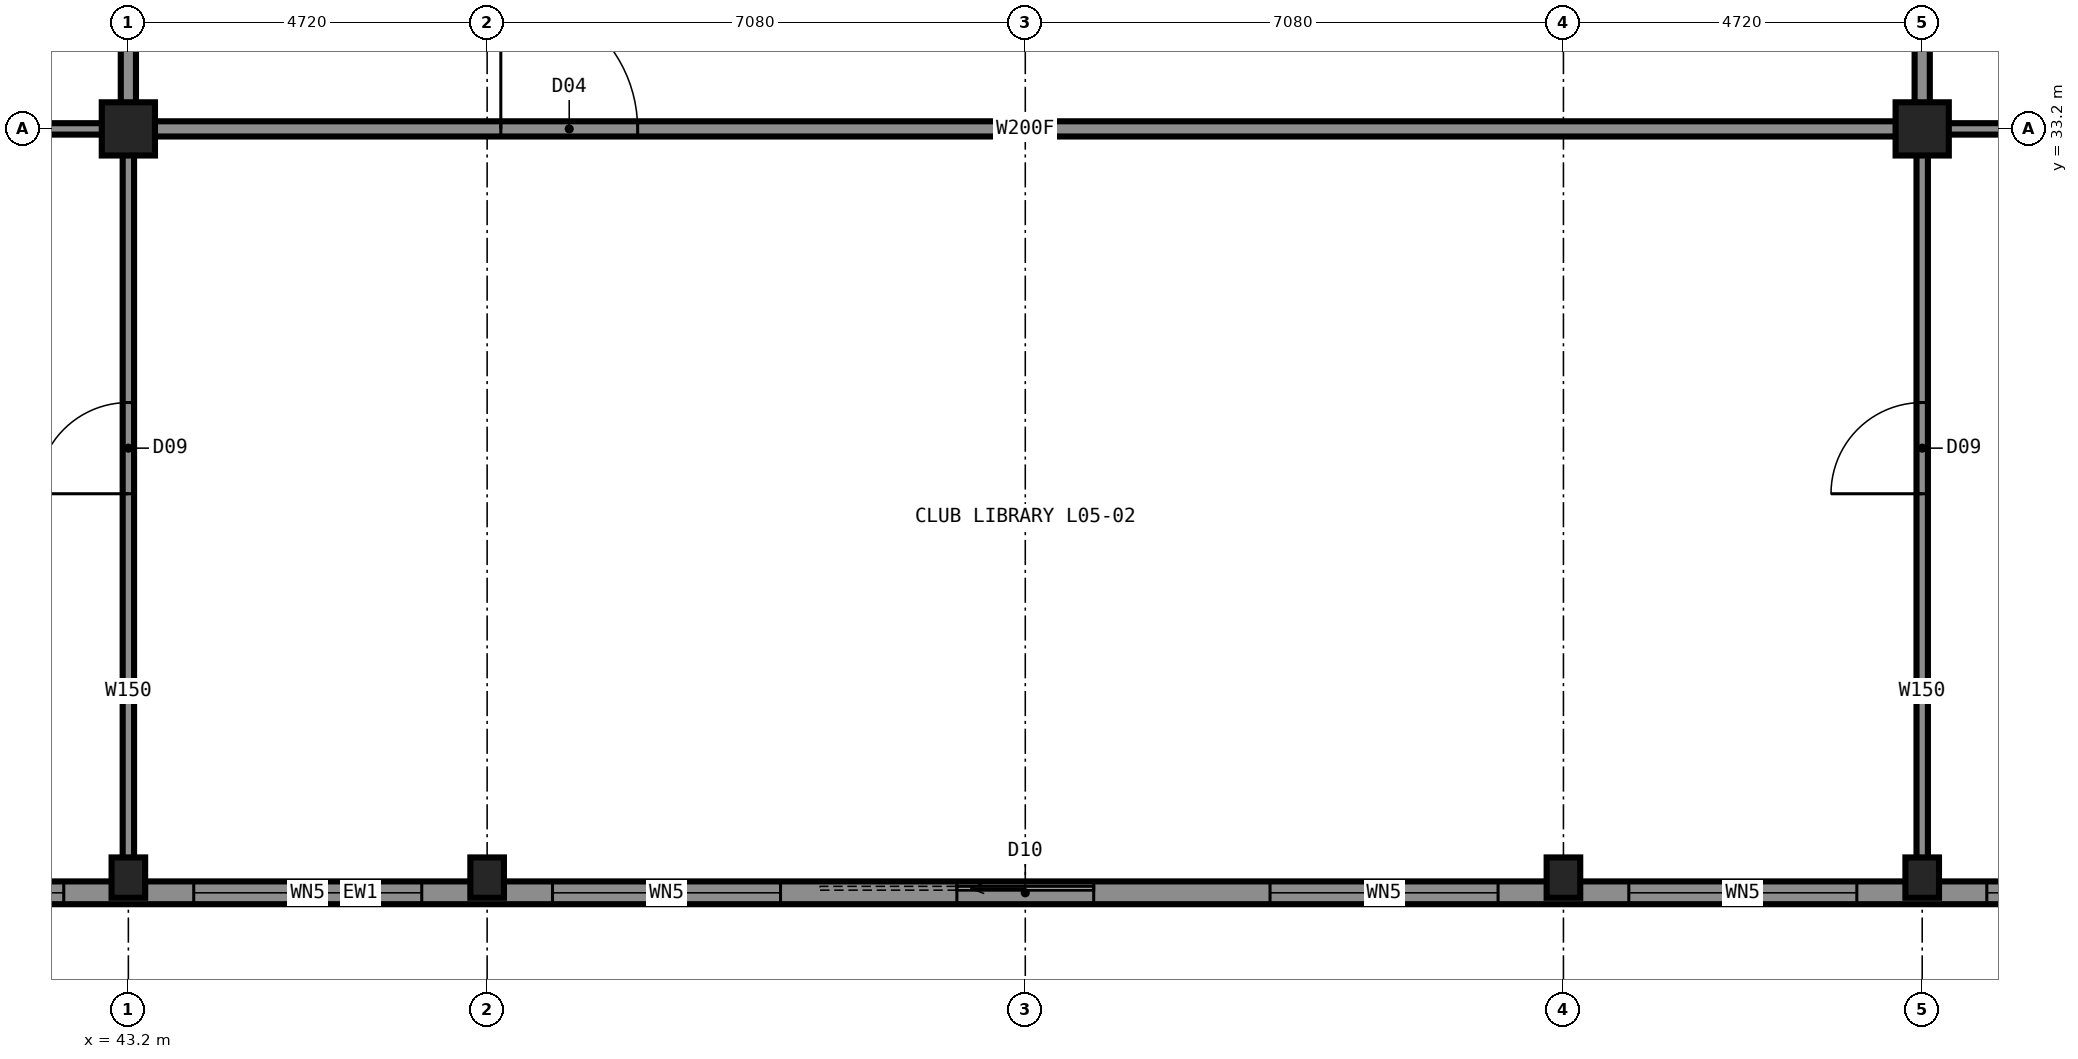
"""IFC4 building model, lengths in metres.
Left out: names, types, materials, properties, quantities, classifications, styles, units other than length and angle.
Written with IfcOpenShell. Run it as: python <this file> out.ifc"""

import sys

from ifc_helpers import new_model, si_unit, direction, frame, frame_2d, origin, origin_2d, place, context, subcontext, project, spatial, rectangle, hollow_rectangle, i_section, extrude, element, fill, save


model = new_model("IFC4")
c1 = context("Model", 3, precision=1e-05, world=origin(), true_north=direction((0.0, 1.0)))
c2 = subcontext(c1, "Body", "Model", "MODEL_VIEW")
j1 = project(units=[si_unit("LENGTHUNIT", "METRE"), si_unit("PLANEANGLEUNIT", "RADIAN")], contexts=[c1])
p1 = place(None, origin())
s1 = spatial("IfcSite", under=j1, at=p1, CompositionType="ELEMENT")
p2 = place(p1, origin())
s2 = spatial("IfcBuilding", under=s1, at=p2, CompositionType="ELEMENT")
p3 = place(p2, frame((0.0, 0.0, 25.0)))
s3 = spatial("IfcBuildingStorey", under=s2, at=p3, CompositionType="ELEMENT", Elevation=25.0)
for number, where, z_axis, x_axis in (
    (1, (43.2, 23.35, 0.0), (0.0, 0.0, 1.0), (1.0, 0.0, 0.0)),
    (2, (47.92, 23.35, 0.0), (0.0, 0.0, 1.0), (1.0, 0.0, 0.0)),
    (3, (62.08, 23.35, 0.0), (0.0, 0.0, 1.0), (1.0, 0.0, 0.0)),
    (4, (66.8, 23.35, 0.0), (0.0, 0.0, 1.0), (1.0, 0.0, 0.0)),
):
    element("IfcColumn", number, at=place(p3, frame(where, z_axis=z_axis, x_axis=x_axis)), inside=s3, PredefinedType="COLUMN", context=c2, shape_type="SweptSolid", body=[
        extrude(i_section(OverallWidth=0.442, OverallDepth=0.531, WebThickness=0.066, FlangeThickness=0.106, at=origin_2d()), origin(), (0.0, 0.0, 1.0), 3.5),
    ])
for number, where, z_axis, x_axis in (
    (5, (43.2, 33.2, 0.0), (0.0, 0.0, 1.0), (1.0, 0.0, 0.0)),
    (6, (66.8, 33.2, 0.0), (0.0, 0.0, 1.0), (1.0, 0.0, 0.0)),
):
    element("IfcColumn", number, at=place(p3, frame(where, z_axis=z_axis, x_axis=x_axis)), inside=s3, PredefinedType="COLUMN", context=c2, shape_type="SweptSolid", body=[
        extrude(hollow_rectangle(XDim=0.7, YDim=0.7, WallThickness=0.06, at=origin_2d()), origin(), (0.0, 0.0, 1.0), 3.5),
    ])
p4 = place(p3, frame((43.2, 33.2, 0.0), z_axis=(0.0, 0.0, 1.0), x_axis=(1.0, 0.0, 0.0)))
e7 = element("IfcWall", 7, at=p4, inside=s3, PredefinedType="PARTITIONING", context=c2, shape_type="SweptSolid", body=[
    extrude(rectangle(XDim=23.6, YDim=0.2, at=frame_2d((11.8, 0.0))), origin(), (0.0, 0.0, 1.0), 3.33),
])
p5 = place(p4, frame((4.9, 0.0, 0.0)))
e8 = element("IfcOpeningElement", 8, at=p5, cuts=e7, PredefinedType="OPENING", context=c2, shape_type="SweptSolid", body=[
    extrude(rectangle(XDim=1.8, YDim=2.2, at=frame_2d((0.9, 1.1))), frame((0.0, 0.11, 0.0), z_axis=(0.0, -1.0, 0.0), x_axis=(1.0, 0.0, 0.0)), (0.0, 0.0, 1.0), 0.22),
])
for number, where, z_axis, x_axis in (
    (9, (33.3, 33.2, 0.0), (0.0, 0.0, 1.0), (1.0, 0.0, 0.0)),
    (10, (66.8, 33.2, 0.0), (0.0, 0.0, 1.0), (1.0, 0.0, 0.0)),
):
    element("IfcWall", number, at=place(p3, frame(where, z_axis=z_axis, x_axis=x_axis)), inside=s3, PredefinedType="PARTITIONING", context=c2, shape_type="SweptSolid", body=[
        extrude(rectangle(XDim=9.9, YDim=0.15, at=frame_2d((4.95, 0.0))), origin(), (0.0, 0.0, 1.0), 2.573),
    ])
p6 = place(p3, frame((43.2, 33.2, 0.0), z_axis=(0.0, 0.0, 1.0), x_axis=(0.0, 1.0, 0.0)))
e11 = element("IfcWall", 11, at=p6, inside=s3, PredefinedType="PARTITIONING", context=c2, shape_type="SweptSolid", body=[
    extrude(rectangle(XDim=23.6, YDim=0.2, at=frame_2d((11.8, 0.0))), origin(), (0.0, 0.0, 1.0), 3.33),
])
p7 = place(p6, frame((13.2, 0.0, 0.0)))
e12 = element("IfcOpeningElement", 12, at=p7, cuts=e11, PredefinedType="OPENING", context=c2, shape_type="SweptSolid", body=[
    extrude(rectangle(XDim=1.2, YDim=2.2, at=frame_2d((0.6, 1.1))), frame((0.0, 0.11, 0.0), z_axis=(0.0, -1.0, 0.0), x_axis=(1.0, 0.0, 0.0)), (0.0, 0.0, 1.0), 0.22),
])
p8 = place(p3, frame((43.2, 23.3, 0.0), z_axis=(0.0, 0.0, 1.0), x_axis=(0.0, 1.0, 0.0)))
e13 = element("IfcWall", 13, at=p8, inside=s3, PredefinedType="PARTITIONING", context=c2, shape_type="SweptSolid", body=[
    extrude(rectangle(XDim=9.9, YDim=0.15, at=frame_2d((4.95, 0.0))), origin(), (0.0, 0.0, 1.0), 2.573),
])
p9 = place(p8, frame((5.1, 0.0, 0.0)))
e14 = element("IfcOpeningElement", 14, at=p9, cuts=e13, PredefinedType="OPENING", context=c2, shape_type="SweptSolid", body=[
    extrude(rectangle(XDim=1.2, YDim=2.2, at=frame_2d((0.6, 1.1))), frame((0.0, 0.085, 0.0), z_axis=(0.0, -1.0, 0.0), x_axis=(1.0, 0.0, 0.0)), (0.0, 0.0, 1.0), 0.17),
])
p10 = place(p3, frame((66.8, 33.2, 0.0), z_axis=(0.0, 0.0, 1.0), x_axis=(0.0, 1.0, 0.0)))
e15 = element("IfcWall", 15, at=p10, inside=s3, PredefinedType="PARTITIONING", context=c2, shape_type="SweptSolid", body=[
    extrude(rectangle(XDim=23.6, YDim=0.2, at=frame_2d((11.8, 0.0))), origin(), (0.0, 0.0, 1.0), 3.33),
])
p11 = place(p10, frame((18.2, 0.0, 0.0)))
e16 = element("IfcOpeningElement", 16, at=p11, cuts=e15, PredefinedType="OPENING", context=c2, shape_type="SweptSolid", body=[
    extrude(rectangle(XDim=1.2, YDim=2.2, at=frame_2d((0.6, 1.1))), frame((0.0, 0.11, 0.0), z_axis=(0.0, -1.0, 0.0), x_axis=(1.0, 0.0, 0.0)), (0.0, 0.0, 1.0), 0.22),
])
p12 = place(p10, frame((10.12, 0.0, 0.0)))
e17 = element("IfcOpeningElement", 17, at=p12, cuts=e15, PredefinedType="OPENING", context=c2, shape_type="SweptSolid", body=[
    extrude(rectangle(XDim=1.0, YDim=2.1, at=frame_2d((0.5, 1.05))), frame((0.0, 0.11, 0.0), z_axis=(0.0, -1.0, 0.0), x_axis=(1.0, 0.0, 0.0)), (0.0, 0.0, 1.0), 0.22),
])
p13 = place(p10, frame((12.53, 0.0, 0.0)))
e18 = element("IfcOpeningElement", 18, at=p13, cuts=e15, PredefinedType="OPENING", context=c2, shape_type="SweptSolid", body=[
    extrude(rectangle(XDim=0.9, YDim=2.1, at=frame_2d((0.45, 1.05))), frame((0.0, 0.11, 0.0), z_axis=(0.0, -1.0, 0.0), x_axis=(1.0, 0.0, 0.0)), (0.0, 0.0, 1.0), 0.22),
])
p14 = place(p10, frame((1.91, 0.0, 0.0)))
e19 = element("IfcOpeningElement", 19, at=p14, cuts=e15, PredefinedType="OPENING", context=c2, shape_type="SweptSolid", body=[
    extrude(rectangle(XDim=0.9, YDim=2.1, at=frame_2d((0.45, 1.05))), frame((0.0, 0.11, 0.0), z_axis=(0.0, -1.0, 0.0), x_axis=(1.0, 0.0, 0.0)), (0.0, 0.0, 1.0), 0.22),
])
p15 = place(p10, frame((6.63, 0.0, 0.0)))
e20 = element("IfcOpeningElement", 20, at=p15, cuts=e15, PredefinedType="OPENING", context=c2, shape_type="SweptSolid", body=[
    extrude(rectangle(XDim=0.9, YDim=2.1, at=frame_2d((0.45, 1.05))), frame((0.0, 0.11, 0.0), z_axis=(0.0, -1.0, 0.0), x_axis=(1.0, 0.0, 0.0)), (0.0, 0.0, 1.0), 0.22),
])
p16 = place(p3, frame((66.8, 23.3, 0.0), z_axis=(0.0, 0.0, 1.0), x_axis=(0.0, 1.0, 0.0)))
e21 = element("IfcWall", 21, at=p16, inside=s3, PredefinedType="PARTITIONING", context=c2, shape_type="SweptSolid", body=[
    extrude(rectangle(XDim=9.9, YDim=0.15, at=frame_2d((4.95, 0.0))), origin(), (0.0, 0.0, 1.0), 2.573),
])
p17 = place(p16, frame((5.1, 0.0, 0.0)))
e22 = element("IfcOpeningElement", 22, at=p17, cuts=e21, PredefinedType="OPENING", context=c2, shape_type="SweptSolid", body=[
    extrude(rectangle(XDim=1.2, YDim=2.2, at=frame_2d((0.6, 1.1))), frame((0.0, 0.085, 0.0), z_axis=(0.0, -1.0, 0.0), x_axis=(1.0, 0.0, 0.0)), (0.0, 0.0, 1.0), 0.17),
])
p18 = place(p3, frame((38.5, 23.15, 0.0), z_axis=(0.0, 0.0, 1.0), x_axis=(1.0, 0.0, 0.0)))
e23 = element("IfcWall", 23, at=p18, inside=s3, PredefinedType="SOLIDWALL", context=c2, shape_type="SweptSolid", body=[
    extrude(rectangle(XDim=33.0, YDim=0.3, at=frame_2d((16.5, 0.0))), origin(), (0.0, 0.0, 1.0), 2.83),
])
p19 = place(p18, frame((0.85, 0.0, 0.3)))
e24 = element("IfcOpeningElement", 24, at=p19, cuts=e23, PredefinedType="OPENING", context=c2, shape_type="SweptSolid", body=[
    extrude(rectangle(XDim=3.0, YDim=2.5, at=frame_2d((1.5, 1.25))), frame((0.0, 0.16, 0.0), z_axis=(0.0, -1.0, 0.0), x_axis=(1.0, 0.0, 0.0)), (0.0, 0.0, 1.0), 0.32),
])
p20 = place(p18, frame((5.56, 0.0, 0.3)))
e25 = element("IfcOpeningElement", 25, at=p20, cuts=e23, PredefinedType="OPENING", context=c2, shape_type="SweptSolid", body=[
    extrude(rectangle(XDim=3.0, YDim=2.5, at=frame_2d((1.5, 1.25))), frame((0.0, 0.16, 0.0), z_axis=(0.0, -1.0, 0.0), x_axis=(1.0, 0.0, 0.0)), (0.0, 0.0, 1.0), 0.32),
])
p21 = place(p18, frame((10.28, 0.0, 0.3)))
e26 = element("IfcOpeningElement", 26, at=p21, cuts=e23, PredefinedType="OPENING", context=c2, shape_type="SweptSolid", body=[
    extrude(rectangle(XDim=3.0, YDim=2.5, at=frame_2d((1.5, 1.25))), frame((0.0, 0.16, 0.0), z_axis=(0.0, -1.0, 0.0), x_axis=(1.0, 0.0, 0.0)), (0.0, 0.0, 1.0), 0.32),
])
p22 = place(p18, frame((15.6, 0.0, 0.0)))
e27 = element("IfcOpeningElement", 27, at=p22, cuts=e23, PredefinedType="OPENING", context=c2, shape_type="SweptSolid", body=[
    extrude(rectangle(XDim=1.8, YDim=2.4, at=frame_2d((0.9, 1.2))), frame((0.0, 0.16, 0.0), z_axis=(0.0, -1.0, 0.0), x_axis=(1.0, 0.0, 0.0)), (0.0, 0.0, 1.0), 0.32),
])
p23 = place(p18, frame((19.72, 0.0, 0.3)))
e28 = element("IfcOpeningElement", 28, at=p23, cuts=e23, PredefinedType="OPENING", context=c2, shape_type="SweptSolid", body=[
    extrude(rectangle(XDim=3.0, YDim=2.5, at=frame_2d((1.5, 1.25))), frame((0.0, 0.16, 0.0), z_axis=(0.0, -1.0, 0.0), x_axis=(1.0, 0.0, 0.0)), (0.0, 0.0, 1.0), 0.32),
])
p24 = place(p18, frame((24.44, 0.0, 0.3)))
e29 = element("IfcOpeningElement", 29, at=p24, cuts=e23, PredefinedType="OPENING", context=c2, shape_type="SweptSolid", body=[
    extrude(rectangle(XDim=3.0, YDim=2.5, at=frame_2d((1.5, 1.25))), frame((0.0, 0.16, 0.0), z_axis=(0.0, -1.0, 0.0), x_axis=(1.0, 0.0, 0.0)), (0.0, 0.0, 1.0), 0.32),
])
p25 = place(p18, frame((29.15, 0.0, 0.3)))
e30 = element("IfcOpeningElement", 30, at=p25, cuts=e23, PredefinedType="OPENING", context=c2, shape_type="SweptSolid", body=[
    extrude(rectangle(XDim=3.0, YDim=2.5, at=frame_2d((1.5, 1.25))), frame((0.0, 0.16, 0.0), z_axis=(0.0, -1.0, 0.0), x_axis=(1.0, 0.0, 0.0)), (0.0, 0.0, 1.0), 0.32),
])
p26 = place(p5, origin())
e31 = element("IfcDoor", 31, at=p26, inside=s3, OperationType="DOUBLE_DOOR_SINGLE_SWING", PredefinedType="DOOR", context=c2, shape_type="SweptSolid", body=[
    extrude(rectangle(XDim=1.8, YDim=2.2, at=frame_2d((0.9, 1.1))), frame((0.0, 0.025, 0.0), z_axis=(0.0, -1.0, 0.0), x_axis=(1.0, 0.0, 0.0)), (0.0, 0.0, 1.0), 0.05),
])
fill(e8, e31)
p27 = place(p17, origin())
e32 = element("IfcDoor", 32, at=p27, inside=s3, OperationType="SINGLE_SWING_LEFT", PredefinedType="DOOR", context=c2, shape_type="SweptSolid", body=[
    extrude(rectangle(XDim=1.2, YDim=2.2, at=frame_2d((0.6, 1.1))), frame((0.0, 0.025, 0.0), z_axis=(0.0, -1.0, 0.0), x_axis=(1.0, 0.0, 0.0)), (0.0, 0.0, 1.0), 0.05),
])
fill(e22, e32)
p28 = place(p9, origin())
e33 = element("IfcDoor", 33, at=p28, inside=s3, OperationType="SINGLE_SWING_LEFT", PredefinedType="DOOR", context=c2, shape_type="SweptSolid", body=[
    extrude(rectangle(XDim=1.2, YDim=2.2, at=frame_2d((0.6, 1.1))), frame((0.0, 0.025, 0.0), z_axis=(0.0, -1.0, 0.0), x_axis=(1.0, 0.0, 0.0)), (0.0, 0.0, 1.0), 0.05),
])
fill(e14, e33)
p29 = place(p19, origin())
e34 = element("IfcWindow", 34, at=p29, inside=s3, PartitioningType="SINGLE_PANEL", PredefinedType="WINDOW", context=c2, shape_type="SweptSolid", body=[
    extrude(rectangle(XDim=3.0, YDim=2.5, at=frame_2d((1.5, 1.25))), frame((0.0, 0.03, 0.0), z_axis=(0.0, -1.0, 0.0), x_axis=(1.0, 0.0, 0.0)), (0.0, 0.0, 1.0), 0.06),
])
fill(e24, e34)
p30 = place(p20, origin())
e35 = element("IfcWindow", 35, at=p30, inside=s3, PartitioningType="SINGLE_PANEL", PredefinedType="WINDOW", context=c2, shape_type="SweptSolid", body=[
    extrude(rectangle(XDim=3.0, YDim=2.5, at=frame_2d((1.5, 1.25))), frame((0.0, 0.03, 0.0), z_axis=(0.0, -1.0, 0.0), x_axis=(1.0, 0.0, 0.0)), (0.0, 0.0, 1.0), 0.06),
])
fill(e25, e35)
p31 = place(p21, origin())
e36 = element("IfcWindow", 36, at=p31, inside=s3, PartitioningType="SINGLE_PANEL", PredefinedType="WINDOW", context=c2, shape_type="SweptSolid", body=[
    extrude(rectangle(XDim=3.0, YDim=2.5, at=frame_2d((1.5, 1.25))), frame((0.0, 0.03, 0.0), z_axis=(0.0, -1.0, 0.0), x_axis=(1.0, 0.0, 0.0)), (0.0, 0.0, 1.0), 0.06),
])
fill(e26, e36)
p32 = place(p22, origin())
e37 = element("IfcDoor", 37, at=p32, inside=s3, OperationType="SLIDING_TO_LEFT", PredefinedType="DOOR", context=c2, shape_type="SweptSolid", body=[
    extrude(rectangle(XDim=1.8, YDim=2.4, at=frame_2d((0.9, 1.2))), frame((0.0, 0.025, 0.0), z_axis=(0.0, -1.0, 0.0), x_axis=(1.0, 0.0, 0.0)), (0.0, 0.0, 1.0), 0.05),
])
fill(e27, e37)
p33 = place(p23, origin())
e38 = element("IfcWindow", 38, at=p33, inside=s3, PartitioningType="SINGLE_PANEL", PredefinedType="WINDOW", context=c2, shape_type="SweptSolid", body=[
    extrude(rectangle(XDim=3.0, YDim=2.5, at=frame_2d((1.5, 1.25))), frame((0.0, 0.03, 0.0), z_axis=(0.0, -1.0, 0.0), x_axis=(1.0, 0.0, 0.0)), (0.0, 0.0, 1.0), 0.06),
])
fill(e28, e38)
p34 = place(p24, origin())
e39 = element("IfcWindow", 39, at=p34, inside=s3, PartitioningType="SINGLE_PANEL", PredefinedType="WINDOW", context=c2, shape_type="SweptSolid", body=[
    extrude(rectangle(XDim=3.0, YDim=2.5, at=frame_2d((1.5, 1.25))), frame((0.0, 0.03, 0.0), z_axis=(0.0, -1.0, 0.0), x_axis=(1.0, 0.0, 0.0)), (0.0, 0.0, 1.0), 0.06),
])
fill(e29, e39)
p35 = place(p25, origin())
e40 = element("IfcWindow", 40, at=p35, inside=s3, PartitioningType="SINGLE_PANEL", PredefinedType="WINDOW", context=c2, shape_type="SweptSolid", body=[
    extrude(rectangle(XDim=3.0, YDim=2.5, at=frame_2d((1.5, 1.25))), frame((0.0, 0.03, 0.0), z_axis=(0.0, -1.0, 0.0), x_axis=(1.0, 0.0, 0.0)), (0.0, 0.0, 1.0), 0.06),
])
fill(e30, e40)
save(model, sys.argv[1])
